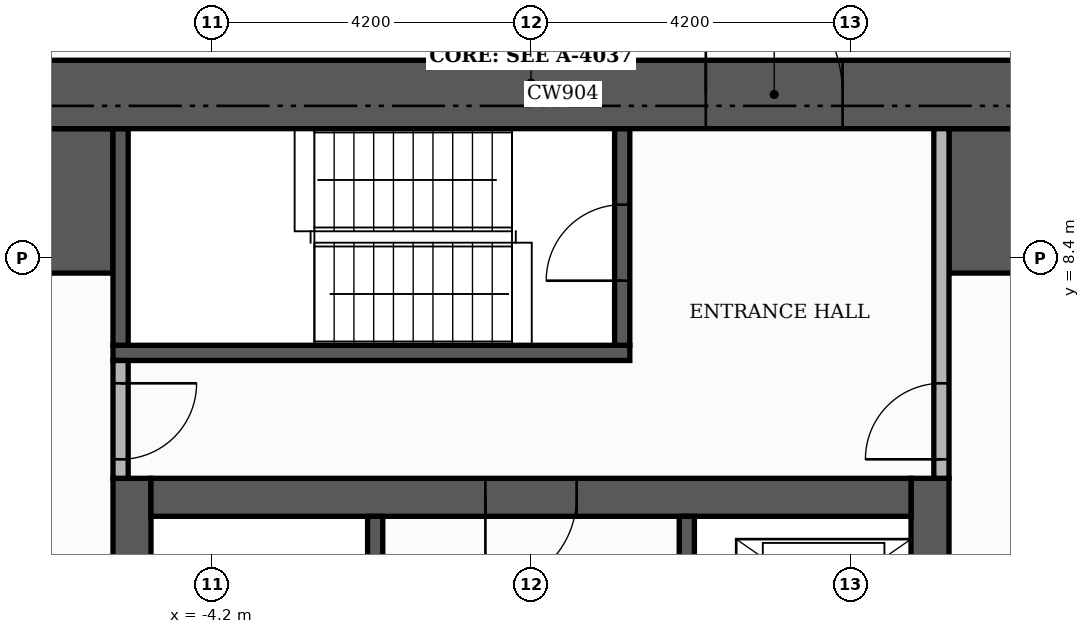
"""IFC4 building model, lengths in metres.
Left out: names, types, materials, properties, quantities, classifications, styles, units other than length and angle.
Written with IfcOpenShell. Run it as: python <this file> out.ifc"""

import sys

from ifc_helpers import new_model, si_unit, direction, frame, frame_2d, origin, place, context, subcontext, project, spatial, rectangle, extrude, element, fill, save


model = new_model("IFC4")
c1 = context("Model", 3, precision=1e-05, world=origin(), true_north=direction((0.0, 1.0)))
c2 = subcontext(c1, "Body", "Model", "MODEL_VIEW")
j1 = project(units=[si_unit("LENGTHUNIT", "METRE"), si_unit("PLANEANGLEUNIT", "RADIAN")], contexts=[c1])
p1 = place(None, origin())
s1 = spatial("IfcSite", under=j1, at=p1, CompositionType="ELEMENT")
p2 = place(p1, origin())
s2 = spatial("IfcBuilding", under=s1, at=p2, CompositionType="ELEMENT")
p3 = place(p2, frame((0.0, 0.0, 223.5)))
s3 = spatial("IfcBuildingStorey", under=s2, at=p3, CompositionType="ELEMENT", Elevation=223.5)
for number, where, z_axis, x_axis in (
    (1, (-5.25, -5.0, 0.0), (0.0, 0.0, 1.0), (0.0, 1.0, 0.0)),
    (2, (5.25, -5.0, 0.0), (0.0, 0.0, 1.0), (0.0, 1.0, 0.0)),
):
    element("IfcWall", number, at=place(p3, frame(where, z_axis=z_axis, x_axis=x_axis)), inside=s3, PredefinedType="SHEAR", context=c2, shape_type="SweptSolid", body=[
        extrude(rectangle(XDim=10.5, YDim=0.5, at=frame_2d((5.25, 0.0))), origin(), (0.0, 0.0, 1.0), 3.48),
    ])
p4 = place(p3, frame((-5.0, 5.25, 0.0), z_axis=(0.0, 0.0, 1.0), x_axis=(1.0, 0.0, 0.0)))
e3 = element("IfcWall", 3, at=p4, inside=s3, PredefinedType="SHEAR", context=c2, shape_type="SweptSolid", body=[
    extrude(rectangle(XDim=10.0, YDim=0.5, at=frame_2d((5.0, 0.0))), origin(), (0.0, 0.0, 1.0), 3.48),
])
p5 = place(p4, frame((4.4, 0.0, 0.0)))
e4 = element("IfcOpeningElement", 4, at=p5, cuts=e3, PredefinedType="OPENING", context=c2, shape_type="SweptSolid", body=[
    extrude(rectangle(XDim=1.2, YDim=2.1, at=frame_2d((0.6, 1.05))), frame((0.0, 0.26, 0.0), z_axis=(0.0, -1.0, 0.0), x_axis=(1.0, 0.0, 0.0)), (0.0, 0.0, 1.0), 0.52),
])
for number, where, z_axis, x_axis in (
    (5, (-10.1, 9.15, 0.0), (0.0, 0.0, 1.0), (1.0, 0.0, 0.0)),
    (6, (5.5, 9.15, 0.0), (0.0, 0.0, 1.0), (1.0, 0.0, 0.0)),
):
    element("IfcWall", number, at=place(p3, frame(where, z_axis=z_axis, x_axis=x_axis)), inside=s3, PredefinedType="SHEAR", context=c2, shape_type="SweptSolid", body=[
        extrude(rectangle(XDim=4.6, YDim=1.9, at=frame_2d((2.3, 0.0))), origin(), (0.0, 0.0, 1.0), 3.48),
    ])
p6 = place(p3, frame((-2.05, -1.4, 0.0), z_axis=(0.0, 0.0, 1.0), x_axis=(0.0, 1.0, 0.0)))
e7 = element("IfcWall", 7, at=p6, inside=s3, PredefinedType="SHEAR", context=c2, shape_type="SweptSolid", body=[
    extrude(rectangle(XDim=6.4, YDim=0.2, at=frame_2d((3.2, 0.0))), origin(), (0.0, 0.0, 1.0), 3.48),
])
p7 = place(p6, frame((0.15, 0.0, 0.0)))
e8 = element("IfcOpeningElement", 8, at=p7, cuts=e7, PredefinedType="OPENING", context=c2, shape_type="SweptSolid", body=[
    extrude(rectangle(XDim=1.0, YDim=2.1, at=frame_2d((0.5, 1.05))), frame((0.0, 0.11, 0.0), z_axis=(0.0, -1.0, 0.0), x_axis=(1.0, 0.0, 0.0)), (0.0, 0.0, 1.0), 0.22),
])
p8 = place(p3, frame((-5.5, 7.15, 0.0), z_axis=(0.0, 0.0, 1.0), x_axis=(1.0, 0.0, 0.0)))
e9 = element("IfcWall", 9, at=p8, inside=s3, PredefinedType="SHEAR", context=c2, shape_type="SweptSolid", body=[
    extrude(rectangle(XDim=6.8, YDim=0.2, at=frame_2d((3.4, 0.0))), origin(), (0.0, 0.0, 1.0), 3.48),
])
p9 = place(p3, frame((-5.4, 7.25, 0.0), z_axis=(0.0, 0.0, 1.0), x_axis=(0.0, 1.0, 0.0)))
e10 = element("IfcWall", 10, at=p9, inside=s3, PredefinedType="SHEAR", context=c2, shape_type="SweptSolid", body=[
    extrude(rectangle(XDim=2.85, YDim=0.2, at=frame_2d((1.425, 0.0))), origin(), (0.0, 0.0, 1.0), 3.48),
])
p10 = place(p3, frame((1.2, 7.25, 0.0), z_axis=(0.0, 0.0, 1.0), x_axis=(0.0, 1.0, 0.0)))
e11 = element("IfcWall", 11, at=p10, inside=s3, PredefinedType="SHEAR", context=c2, shape_type="SweptSolid", body=[
    extrude(rectangle(XDim=2.85, YDim=0.2, at=frame_2d((1.425, 0.0))), origin(), (0.0, 0.0, 1.0), 3.48),
])
p11 = place(p10, frame((0.85, 0.0, 0.0)))
e12 = element("IfcOpeningElement", 12, at=p11, cuts=e11, PredefinedType="OPENING", context=c2, shape_type="SweptSolid", body=[
    extrude(rectangle(XDim=1.0, YDim=2.1, at=frame_2d((0.5, 1.05))), frame((0.0, 0.11, 0.0), z_axis=(0.0, -1.0, 0.0), x_axis=(1.0, 0.0, 0.0)), (0.0, 0.0, 1.0), 0.22),
])
p12 = place(p3, frame((2.05, 1.6, 0.0), z_axis=(0.0, 0.0, 1.0), x_axis=(0.0, 1.0, 0.0)))
e13 = element("IfcWall", 13, at=p12, inside=s3, PredefinedType="SHEAR", context=c2, shape_type="SweptSolid", body=[
    extrude(rectangle(XDim=3.4, YDim=0.2, at=frame_2d((1.7, 0.0))), origin(), (0.0, 0.0, 1.0), 3.48),
])
p13 = place(p12, frame((1.75, 0.0, 0.0)))
e14 = element("IfcOpeningElement", 14, at=p13, cuts=e13, PredefinedType="OPENING", context=c2, shape_type="SweptSolid", body=[
    extrude(rectangle(XDim=1.1, YDim=2.1, at=frame_2d((0.55, 1.05))), frame((0.0, 0.11, 0.0), z_axis=(0.0, -1.0, 0.0), x_axis=(1.0, 0.0, 0.0)), (0.0, 0.0, 1.0), 0.22),
])
p14 = place(p12, frame((0.15, 0.0, 0.0)))
e15 = element("IfcOpeningElement", 15, at=p14, cuts=e13, PredefinedType="OPENING", context=c2, shape_type="SweptSolid", body=[
    extrude(rectangle(XDim=0.8, YDim=2.1, at=frame_2d((0.4, 1.05))), frame((0.0, 0.11, 0.0), z_axis=(0.0, -1.0, 0.0), x_axis=(1.0, 0.0, 0.0)), (0.0, 0.0, 1.0), 0.22),
])
p15 = place(p3, frame((-11.0, 10.55, 0.0), z_axis=(0.0, 0.0, 1.0), x_axis=(1.0, 0.0, 0.0)))
e16 = element("IfcWall", 16, at=p15, inside=s3, PredefinedType="SHEAR", context=c2, shape_type="SweptSolid", body=[
    extrude(rectangle(XDim=22.0, YDim=0.9, at=frame_2d((11.0, 0.0))), origin(), (0.0, 0.0, 1.0), 3.48),
])
p16 = place(p15, frame((13.3, 0.0, 0.0)))
e17 = element("IfcOpeningElement", 17, at=p16, cuts=e16, PredefinedType="OPENING", context=c2, shape_type="SweptSolid", body=[
    extrude(rectangle(XDim=1.8, YDim=2.2, at=frame_2d((0.9, 1.1))), frame((0.0, 0.46, 0.0), z_axis=(0.0, -1.0, 0.0), x_axis=(1.0, 0.0, 0.0)), (0.0, 0.0, 1.0), 0.92),
])
p17 = place(p3, frame((-5.4, 5.5, 0.0), z_axis=(0.0, 0.0, 1.0), x_axis=(0.0, 1.0, 0.0)))
e18 = element("IfcWall", 18, at=p17, inside=s3, PredefinedType="PARTITIONING", context=c2, shape_type="SweptSolid", body=[
    extrude(rectangle(XDim=1.55, YDim=0.2, at=frame_2d((0.775, 0.0))), origin(), (0.0, 0.0, 1.0), 3.48),
])
p18 = place(p17, frame((0.25, 0.0, 0.0)))
e19 = element("IfcOpeningElement", 19, at=p18, cuts=e18, PredefinedType="OPENING", context=c2, shape_type="SweptSolid", body=[
    extrude(rectangle(XDim=1.0, YDim=2.1, at=frame_2d((0.5, 1.05))), frame((0.0, 0.11, 0.0), z_axis=(0.0, -1.0, 0.0), x_axis=(1.0, 0.0, 0.0)), (0.0, 0.0, 1.0), 0.22),
])
p19 = place(p3, frame((5.4, 5.5, 0.0), z_axis=(0.0, 0.0, 1.0), x_axis=(0.0, 1.0, 0.0)))
e20 = element("IfcWall", 20, at=p19, inside=s3, PredefinedType="PARTITIONING", context=c2, shape_type="SweptSolid", body=[
    extrude(rectangle(XDim=4.6, YDim=0.2, at=frame_2d((2.3, 0.0))), origin(), (0.0, 0.0, 1.0), 3.48),
])
p20 = place(p19, frame((0.25, 0.0, 0.0)))
e21 = element("IfcOpeningElement", 21, at=p20, cuts=e20, PredefinedType="OPENING", context=c2, shape_type="SweptSolid", body=[
    extrude(rectangle(XDim=1.0, YDim=2.1, at=frame_2d((0.5, 1.05))), frame((0.0, 0.11, 0.0), z_axis=(0.0, -1.0, 0.0), x_axis=(1.0, 0.0, 0.0)), (0.0, 0.0, 1.0), 0.22),
])
p21 = place(p5, frame((1.2, 0.0, 0.0), z_axis=(0.0, 0.0, 1.0), x_axis=(-1.0, 0.0, 0.0)))
e22 = element("IfcDoor", 22, at=p21, inside=s3, OperationType="SINGLE_SWING_LEFT", PredefinedType="DOOR", context=c2, shape_type="SweptSolid", body=[
    extrude(rectangle(XDim=1.2, YDim=2.1, at=frame_2d((0.6, 1.05))), frame((0.0, 0.025, 0.0), z_axis=(0.0, -1.0, 0.0), x_axis=(1.0, 0.0, 0.0)), (0.0, 0.0, 1.0), 0.05),
])
fill(e4, e22)
p22 = place(p11, origin())
e23 = element("IfcDoor", 23, at=p22, inside=s3, OperationType="SINGLE_SWING_LEFT", PredefinedType="DOOR", context=c2, shape_type="SweptSolid", body=[
    extrude(rectangle(XDim=1.0, YDim=2.1, at=frame_2d((0.5, 1.05))), frame((0.0, 0.025, 0.0), z_axis=(0.0, -1.0, 0.0), x_axis=(1.0, 0.0, 0.0)), (0.0, 0.0, 1.0), 0.05),
])
fill(e12, e23)
p23 = place(p18, frame((1.0, 0.0, 0.0), z_axis=(0.0, 0.0, 1.0), x_axis=(-1.0, 0.0, 0.0)))
e24 = element("IfcDoor", 24, at=p23, inside=s3, OperationType="SINGLE_SWING_RIGHT", PredefinedType="DOOR", context=c2, shape_type="SweptSolid", body=[
    extrude(rectangle(XDim=1.0, YDim=2.1, at=frame_2d((0.5, 1.05))), frame((0.0, 0.025, 0.0), z_axis=(0.0, -1.0, 0.0), x_axis=(1.0, 0.0, 0.0)), (0.0, 0.0, 1.0), 0.05),
])
fill(e19, e24)
p24 = place(p20, origin())
e25 = element("IfcDoor", 25, at=p24, inside=s3, OperationType="SINGLE_SWING_LEFT", PredefinedType="DOOR", context=c2, shape_type="SweptSolid", body=[
    extrude(rectangle(XDim=1.0, YDim=2.1, at=frame_2d((0.5, 1.05))), frame((0.0, 0.025, 0.0), z_axis=(0.0, -1.0, 0.0), x_axis=(1.0, 0.0, 0.0)), (0.0, 0.0, 1.0), 0.05),
])
fill(e21, e25)
p25 = place(p16, origin())
e26 = element("IfcDoor", 26, at=p25, inside=s3, OperationType="DOUBLE_DOOR_SINGLE_SWING", PredefinedType="DOOR", context=c2, shape_type="SweptSolid", body=[
    extrude(rectangle(XDim=1.8, YDim=2.2, at=frame_2d((0.9, 1.1))), frame((0.0, 0.025, 0.0), z_axis=(0.0, -1.0, 0.0), x_axis=(1.0, 0.0, 0.0)), (0.0, 0.0, 1.0), 0.05),
])
fill(e17, e26)
save(model, sys.argv[1])
